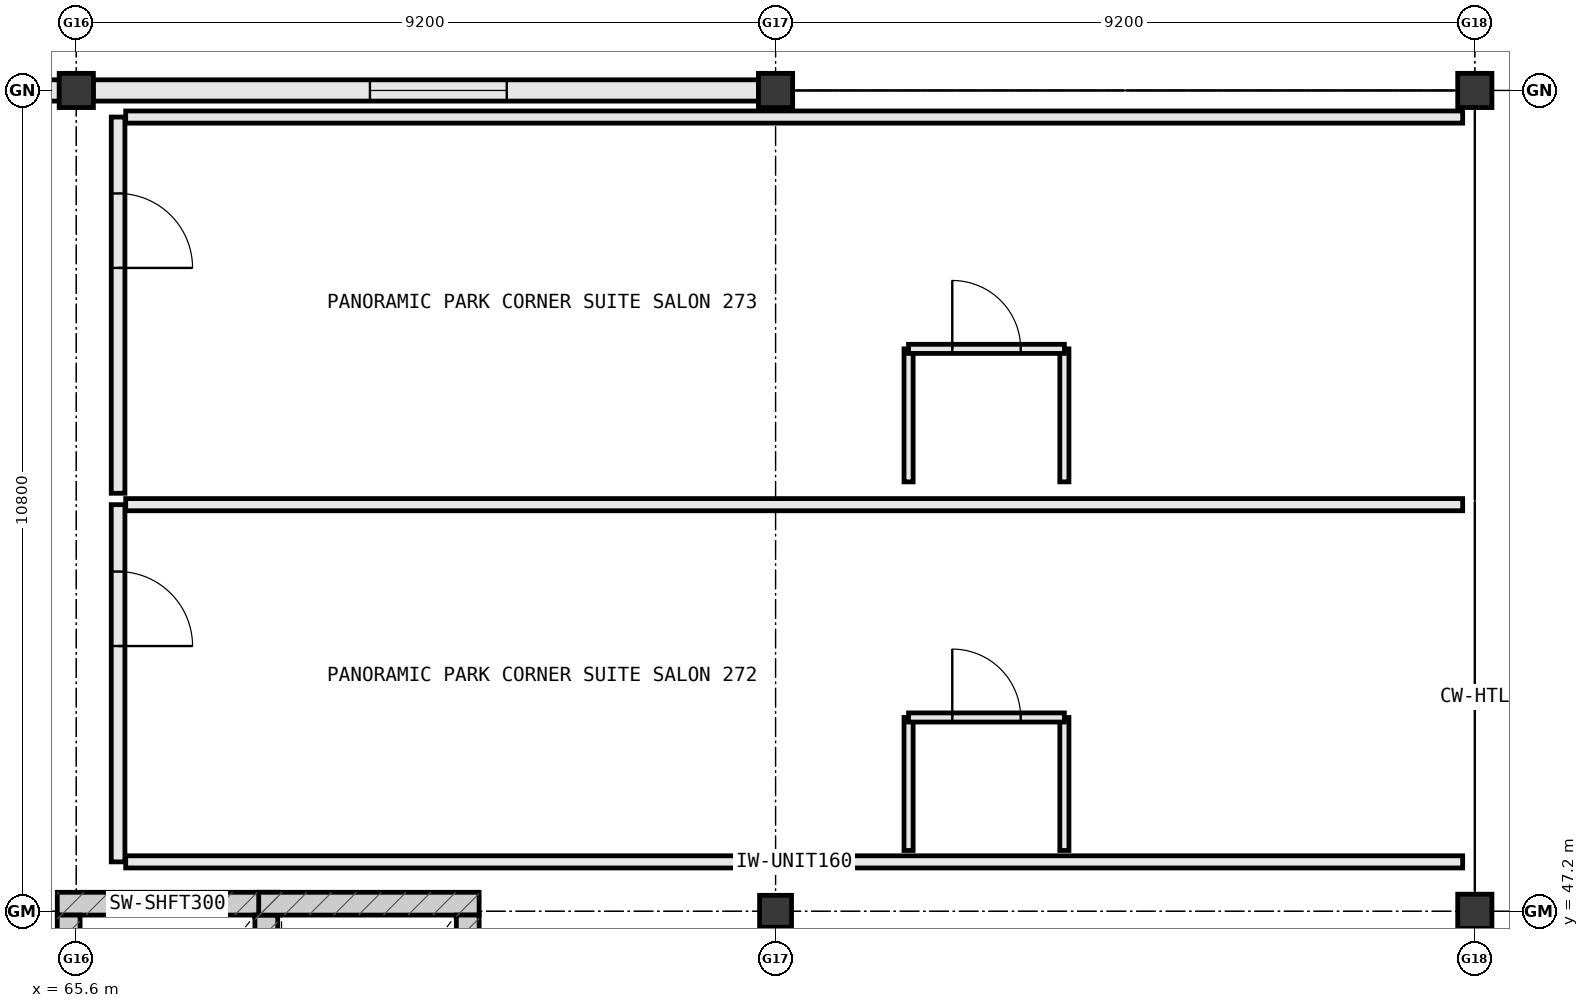
"""IFC4 building model, lengths in metres.
Left out: names, types, materials, properties, quantities, classifications, styles, units other than length and angle.
Written with IfcOpenShell. Run it as: python <this file> out.ifc"""

import sys

from ifc_helpers import new_model, si_unit, direction, frame, frame_2d, origin, origin_2d, place, context, subcontext, project, spatial, rectangle, extrude, element, fill, save


model = new_model("IFC4")
c1 = context("Model", 3, precision=1e-05, world=origin(), true_north=direction((0.0, 1.0)))
c2 = subcontext(c1, "Body", "Model", "MODEL_VIEW")
j1 = project(units=[si_unit("LENGTHUNIT", "METRE"), si_unit("PLANEANGLEUNIT", "RADIAN")], contexts=[c1])
p1 = place(None, origin())
s1 = spatial("IfcSite", under=j1, at=p1, CompositionType="ELEMENT")
p2 = place(p1, origin())
s2 = spatial("IfcBuilding", under=s1, at=p2, CompositionType="ELEMENT")
p3 = place(p2, frame((0.0, 0.0, 39.0)))
s3 = spatial("IfcBuildingStorey", under=s2, at=p3, CompositionType="ELEMENT", Elevation=39.0)
p4 = place(p3, frame((74.8, 47.2, 0.0), z_axis=(0.0, 0.0, 1.0), x_axis=(1.0, 0.0, 0.0)))
e1 = element("IfcColumn", 1, at=p4, inside=s3, PredefinedType="COLUMN", context=c2, shape_type="SweptSolid", body=[
    extrude(rectangle(XDim=0.42, YDim=0.42, at=origin_2d()), origin(), (0.0, 0.0, 1.0), 3.8),
])
for number, where, z_axis, x_axis in (
    (2, (74.8, 58.0, 0.0), (0.0, 0.0, 1.0), (1.0, 0.0, 0.0)),
    (3, (84.0, 47.2, 0.0), (0.0, 0.0, 1.0), (1.0, 0.0, 0.0)),
    (4, (84.0, 58.0, 0.0), (0.0, 0.0, 1.0), (1.0, 0.0, 0.0)),
    (5, (65.6, 58.0, 0.0), (0.0, 0.0, 1.0), (1.0, 0.0, 0.0)),
):
    element("IfcColumn", number, at=place(p3, frame(where, z_axis=z_axis, x_axis=x_axis)), inside=s3, PredefinedType="COLUMN", context=c2, shape_type="SweptSolid", body=[
        extrude(rectangle(XDim=0.45, YDim=0.45, at=origin_2d()), origin(), (0.0, 0.0, 1.0), 3.8),
    ])
p5 = place(p3, frame((74.577, 58.0, 0.0), z_axis=(0.0, 0.0, 1.0), x_axis=(-1.0, 0.0, 0.0)))
e6 = element("IfcWall", 6, at=p5, inside=s3, PredefinedType="STANDARD", context=c2, shape_type="SweptSolid", body=[
    extrude(rectangle(XDim=8.754, YDim=0.28, at=frame_2d((4.377, 0.0))), origin(), (0.0, 0.0, 1.0), 2.88),
])
p6 = place(p5, frame((3.313, 0.0, 0.85)))
e7 = element("IfcOpeningElement", 7, at=p6, cuts=e6, PredefinedType="OPENING", context=c2, shape_type="SweptSolid", body=[
    extrude(rectangle(XDim=1.8, YDim=1.85, at=frame_2d((0.9, 0.925))), frame((0.0, 0.152, 0.0), z_axis=(0.0, -1.0, 0.0), x_axis=(1.0, 0.0, 0.0)), (0.0, 0.0, 1.0), 0.304),
])
p7 = place(p3, frame((65.377, 58.0, 0.0), z_axis=(0.0, 0.0, 1.0), x_axis=(-1.0, 0.0, 0.0)))
e8 = element("IfcWall", 8, at=p7, inside=s3, PredefinedType="STANDARD", context=c2, shape_type="SweptSolid", body=[
    extrude(rectangle(XDim=4.354, YDim=0.28, at=frame_2d((2.177, 0.0))), origin(), (0.0, 0.0, 1.0), 2.88),
])
p8 = place(p7, frame((2.5, 0.0, 0.85)))
e9 = element("IfcOpeningElement", 9, at=p8, cuts=e8, PredefinedType="OPENING", context=c2, shape_type="SweptSolid", body=[
    extrude(rectangle(XDim=1.65, YDim=1.8, at=frame_2d((0.825, 0.9))), frame((0.0, 0.152, 0.0), z_axis=(0.0, -1.0, 0.0), x_axis=(1.0, 0.0, 0.0)), (0.0, 0.0, 1.0), 0.304),
])
for number, where, z_axis, x_axis in (
    (10, (68.25, 47.3, 0.0), (0.0, 0.0, 1.0), (-1.0, 0.0, 0.0)),
    (11, (68.1, 44.25, 0.0), (0.0, 0.0, 1.0), (0.0, 1.0, 0.0)),
    (12, (65.5, 47.15, 0.0), (0.0, 0.0, 1.0), (0.0, -1.0, 0.0)),
    (13, (70.9, 47.3, 0.0), (0.0, 0.0, 1.0), (-1.0, 0.0, 0.0)),
    (14, (70.75, 44.25, 0.0), (0.0, 0.0, 1.0), (0.0, 1.0, 0.0)),
):
    element("IfcWall", number, at=place(p3, frame(where, z_axis=z_axis, x_axis=x_axis)), inside=s3, PredefinedType="SHEAR", context=c2, shape_type="SweptSolid", body=[
        extrude(rectangle(XDim=2.9, YDim=0.3, at=frame_2d((1.45, 0.0))), origin(), (0.0, 0.0, 1.0), 3.8),
    ])
p9 = place(p3, frame((66.15, 52.55, 0.0), z_axis=(0.0, 0.0, 1.0), x_axis=(0.0, -1.0, 0.0)))
e15 = element("IfcWall", 15, at=p9, inside=s3, PredefinedType="PARTITIONING", context=c2, shape_type="SweptSolid", body=[
    extrude(rectangle(XDim=4.7, YDim=0.18, at=frame_2d((2.35, 0.0))), origin(), (0.0, 0.0, 1.0), 3.565),
])
p10 = place(p9, frame((0.88, 0.0, 0.0)))
e16 = element("IfcOpeningElement", 16, at=p10, cuts=e15, PredefinedType="OPENING", context=c2, shape_type="SweptSolid", body=[
    extrude(rectangle(XDim=0.98, YDim=2.18, at=frame_2d((0.49, 1.09))), frame((0.0, 0.102, 0.0), z_axis=(0.0, -1.0, 0.0), x_axis=(1.0, 0.0, 0.0)), (0.0, 0.0, 1.0), 0.204),
])
for number, where, z_axis, x_axis in (
    (17, (66.25, 47.85, 0.0), (0.0, 0.0, 1.0), (1.0, 0.0, 0.0)),
    (18, (66.25, 52.55, 0.0), (0.0, 0.0, 1.0), (1.0, 0.0, 0.0)),
):
    element("IfcWall", number, at=place(p3, frame(where, z_axis=z_axis, x_axis=x_axis)), inside=s3, PredefinedType="PARTITIONING", context=c2, shape_type="SweptSolid", body=[
        extrude(rectangle(XDim=17.59, YDim=0.16, at=frame_2d((8.795, 0.0))), origin(), (0.0, 0.0, 1.0), 3.565),
    ])
for number, where, z_axis, x_axis in (
    (19, (76.55, 48.0, 0.0), (0.0, 0.0, 1.0), (0.0, 1.0, 0.0)),
    (20, (78.6, 48.0, 0.0), (0.0, 0.0, 1.0), (0.0, 1.0, 0.0)),
):
    element("IfcWall", number, at=place(p3, frame(where, z_axis=z_axis, x_axis=x_axis)), inside=s3, PredefinedType="PARTITIONING", context=c2, shape_type="SweptSolid", body=[
        extrude(rectangle(XDim=1.75, YDim=0.12, at=frame_2d((0.875, 0.0))), origin(), (0.0, 0.0, 1.0), 3.565),
    ])
p11 = place(p3, frame((76.55, 49.75, 0.0), z_axis=(0.0, 0.0, 1.0), x_axis=(1.0, 0.0, 0.0)))
e21 = element("IfcWall", 21, at=p11, inside=s3, PredefinedType="PARTITIONING", context=c2, shape_type="SweptSolid", body=[
    extrude(rectangle(XDim=2.05, YDim=0.12, at=frame_2d((1.025, 0.0))), origin(), (0.0, 0.0, 1.0), 3.565),
])
p12 = place(p11, frame((0.575, 0.0, 0.0)))
e22 = element("IfcOpeningElement", 22, at=p12, cuts=e21, PredefinedType="OPENING", context=c2, shape_type="SweptSolid", body=[
    extrude(rectangle(XDim=0.9, YDim=2.15, at=frame_2d((0.45, 1.075))), frame((0.0, 0.072, 0.0), z_axis=(0.0, -1.0, 0.0), x_axis=(1.0, 0.0, 0.0)), (0.0, 0.0, 1.0), 0.144),
])
p13 = place(p3, frame((66.15, 57.65, 0.0), z_axis=(0.0, 0.0, 1.0), x_axis=(0.0, -1.0, 0.0)))
e23 = element("IfcWall", 23, at=p13, inside=s3, PredefinedType="PARTITIONING", context=c2, shape_type="SweptSolid", body=[
    extrude(rectangle(XDim=4.95, YDim=0.18, at=frame_2d((2.475, 0.0))), origin(), (0.0, 0.0, 1.0), 3.565),
])
p14 = place(p13, frame((1.005, 0.0, 0.0)))
e24 = element("IfcOpeningElement", 24, at=p14, cuts=e23, PredefinedType="OPENING", context=c2, shape_type="SweptSolid", body=[
    extrude(rectangle(XDim=0.98, YDim=2.18, at=frame_2d((0.49, 1.09))), frame((0.0, 0.102, 0.0), z_axis=(0.0, -1.0, 0.0), x_axis=(1.0, 0.0, 0.0)), (0.0, 0.0, 1.0), 0.204),
])
p15 = place(p3, frame((66.25, 57.65, 0.0), z_axis=(0.0, 0.0, 1.0), x_axis=(1.0, 0.0, 0.0)))
e25 = element("IfcWall", 25, at=p15, inside=s3, PredefinedType="PARTITIONING", context=c2, shape_type="SweptSolid", body=[
    extrude(rectangle(XDim=17.59, YDim=0.16, at=frame_2d((8.795, 0.0))), origin(), (0.0, 0.0, 1.0), 2.88),
])
for number, where, z_axis, x_axis in (
    (26, (76.55, 52.85, 0.0), (0.0, 0.0, 1.0), (0.0, 1.0, 0.0)),
    (27, (78.6, 52.85, 0.0), (0.0, 0.0, 1.0), (0.0, 1.0, 0.0)),
):
    element("IfcWall", number, at=place(p3, frame(where, z_axis=z_axis, x_axis=x_axis)), inside=s3, PredefinedType="PARTITIONING", context=c2, shape_type="SweptSolid", body=[
        extrude(rectangle(XDim=1.75, YDim=0.12, at=frame_2d((0.875, 0.0))), origin(), (0.0, 0.0, 1.0), 3.565),
    ])
p16 = place(p3, frame((76.55, 54.6, 0.0), z_axis=(0.0, 0.0, 1.0), x_axis=(1.0, 0.0, 0.0)))
e28 = element("IfcWall", 28, at=p16, inside=s3, PredefinedType="PARTITIONING", context=c2, shape_type="SweptSolid", body=[
    extrude(rectangle(XDim=2.05, YDim=0.12, at=frame_2d((1.025, 0.0))), origin(), (0.0, 0.0, 1.0), 3.565),
])
p17 = place(p16, frame((0.575, 0.0, 0.0)))
e29 = element("IfcOpeningElement", 29, at=p17, cuts=e28, PredefinedType="OPENING", context=c2, shape_type="SweptSolid", body=[
    extrude(rectangle(XDim=0.9, YDim=2.15, at=frame_2d((0.45, 1.075))), frame((0.0, 0.072, 0.0), z_axis=(0.0, -1.0, 0.0), x_axis=(1.0, 0.0, 0.0)), (0.0, 0.0, 1.0), 0.144),
])
p18 = place(p6, origin())
e30 = element("IfcWindow", 30, at=p18, inside=s3, PartitioningType="SINGLE_PANEL", PredefinedType="WINDOW", context=c2, shape_type="SweptSolid", body=[
    extrude(rectangle(XDim=1.8, YDim=1.85, at=frame_2d((0.9, 0.925))), frame((0.0, 0.03, 0.0), z_axis=(0.0, -1.0, 0.0), x_axis=(1.0, 0.0, 0.0)), (0.0, 0.0, 1.0), 0.06),
])
fill(e7, e30)
p19 = place(p10, origin())
e31 = element("IfcDoor", 31, at=p19, inside=s3, OperationType="SINGLE_SWING_RIGHT", PredefinedType="DOOR", context=c2, shape_type="SweptSolid", body=[
    extrude(rectangle(XDim=0.98, YDim=2.18, at=frame_2d((0.49, 1.09))), frame((0.0, 0.025, 0.0), z_axis=(0.0, -1.0, 0.0), x_axis=(1.0, 0.0, 0.0)), (0.0, 0.0, 1.0), 0.05),
])
fill(e16, e31)
p20 = place(p12, origin())
e32 = element("IfcDoor", 32, at=p20, inside=s3, OperationType="SINGLE_SWING_LEFT", PredefinedType="DOOR", context=c2, shape_type="SweptSolid", body=[
    extrude(rectangle(XDim=0.9, YDim=2.15, at=frame_2d((0.45, 1.075))), frame((0.0, 0.025, 0.0), z_axis=(0.0, -1.0, 0.0), x_axis=(1.0, 0.0, 0.0)), (0.0, 0.0, 1.0), 0.05),
])
fill(e22, e32)
p21 = place(p14, origin())
e33 = element("IfcDoor", 33, at=p21, inside=s3, OperationType="SINGLE_SWING_RIGHT", PredefinedType="DOOR", context=c2, shape_type="SweptSolid", body=[
    extrude(rectangle(XDim=0.98, YDim=2.18, at=frame_2d((0.49, 1.09))), frame((0.0, 0.025, 0.0), z_axis=(0.0, -1.0, 0.0), x_axis=(1.0, 0.0, 0.0)), (0.0, 0.0, 1.0), 0.05),
])
fill(e24, e33)
p22 = place(p17, origin())
e34 = element("IfcDoor", 34, at=p22, inside=s3, OperationType="SINGLE_SWING_LEFT", PredefinedType="DOOR", context=c2, shape_type="SweptSolid", body=[
    extrude(rectangle(XDim=0.9, YDim=2.15, at=frame_2d((0.45, 1.075))), frame((0.0, 0.025, 0.0), z_axis=(0.0, -1.0, 0.0), x_axis=(1.0, 0.0, 0.0)), (0.0, 0.0, 1.0), 0.05),
])
fill(e29, e34)
save(model, sys.argv[1])
